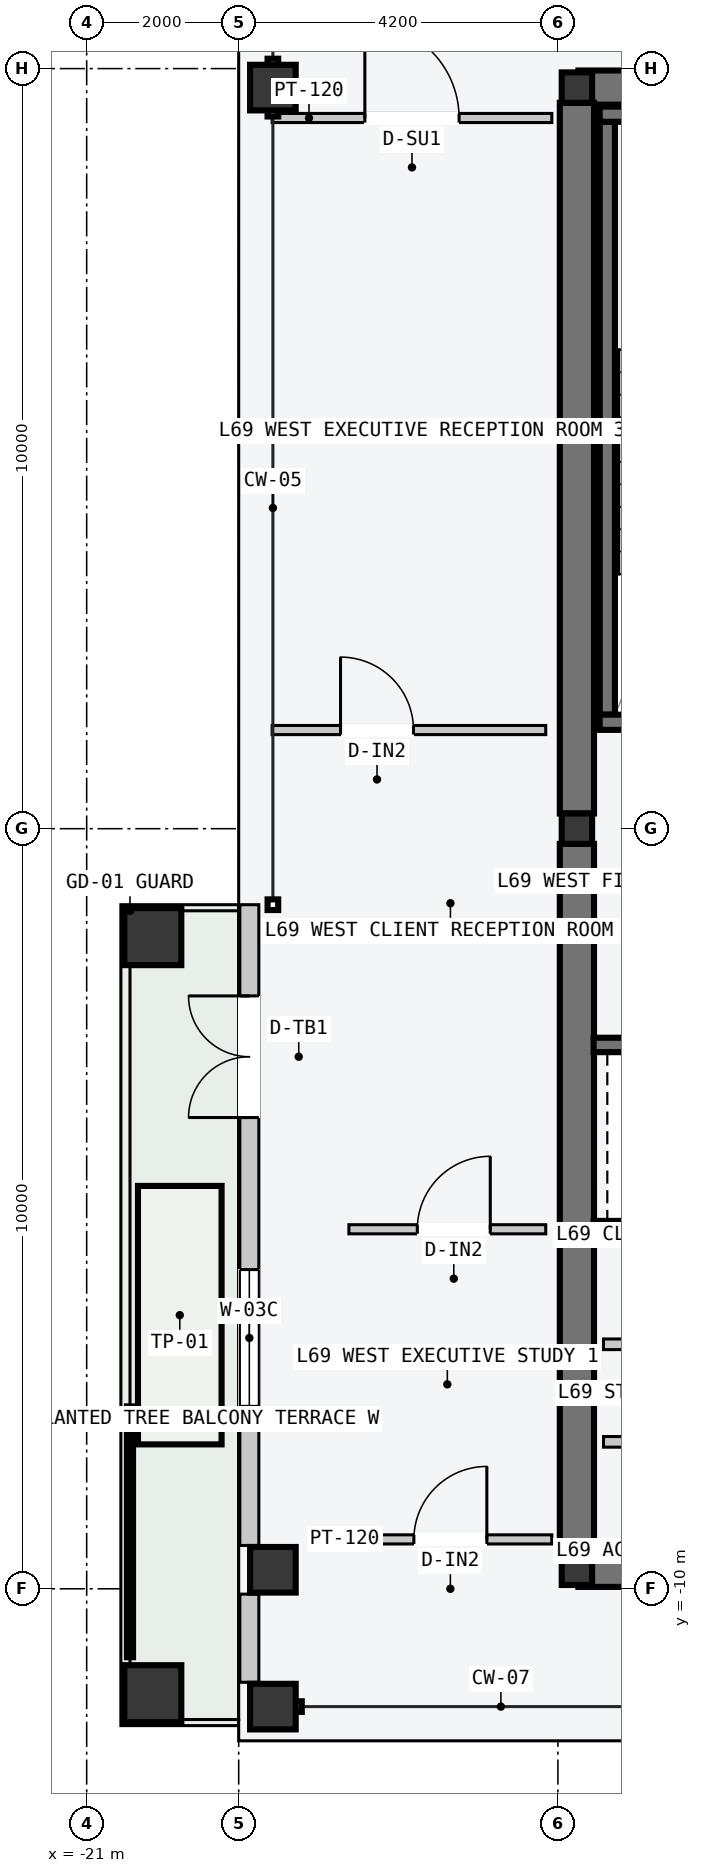
"""IFC4 building model, lengths in metres.
Left out: names, types, materials, properties, quantities, classifications, styles, units other than length and angle.
Written with IfcOpenShell. Run it as: python <this file> out.ifc"""

import sys

from ifc_helpers import new_model, si_unit, direction, frame, frame_2d, origin, origin_2d, place, context, subcontext, project, spatial, rectangle, hollow_rectangle, i_section, extrude, element, fill, save


model = new_model("IFC4")
c1 = context("Model", 3, precision=1e-05, world=origin(), true_north=direction((0.0, 1.0)))
c2 = subcontext(c1, "Body", "Model", "MODEL_VIEW")
j1 = project(units=[si_unit("LENGTHUNIT", "METRE"), si_unit("PLANEANGLEUNIT", "RADIAN")], contexts=[c1])
p1 = place(None, origin())
s1 = spatial("IfcSite", under=j1, at=p1, CompositionType="ELEMENT")
p2 = place(p1, origin())
s2 = spatial("IfcBuilding", under=s1, at=p2, CompositionType="ELEMENT")
p3 = place(p2, frame((0.0, 0.0, 261.6)))
s3 = spatial("IfcBuildingStorey", under=s2, at=p3, CompositionType="ELEMENT", Elevation=261.6)
for number, where, z_axis, x_axis in (
    (1, (-14.53, -9.75, -0.2), (0.0, 0.0, 1.0), (1.0, 0.0, 0.0)),
    (2, (-14.53, 9.75, -0.2), (0.0, 0.0, 1.0), (1.0, 0.0, 0.0)),
):
    element("IfcWall", number, at=place(p3, frame(where, z_axis=z_axis, x_axis=x_axis)), inside=s3, PredefinedType="SHEAR", context=c2, shape_type="SweptSolid", body=[
        extrude(rectangle(XDim=6.46, YDim=0.45, at=frame_2d((3.23, 0.0))), origin(), (0.0, 0.0, 1.0), 3.6),
    ])
for number, where, z_axis, x_axis in (
    (3, (-14.55, -9.55, -0.2), (0.0, 0.0, 1.0), (0.0, 1.0, 0.0)),
    (4, (-14.55, 0.2, -0.2), (0.0, 0.0, 1.0), (0.0, 1.0, 0.0)),
):
    element("IfcWall", number, at=place(p3, frame(where, z_axis=z_axis, x_axis=x_axis)), inside=s3, PredefinedType="SHEAR", context=c2, shape_type="SweptSolid", body=[
        extrude(rectangle(XDim=9.35, YDim=0.45, at=frame_2d((4.675, 0.0))), origin(), (0.0, 0.0, 1.0), 3.6),
    ])
p4 = place(p3, frame((-14.15, 1.5, -0.2), z_axis=(0.0, 0.0, 1.0), x_axis=(0.0, 1.0, 0.0)))
e5 = element("IfcWall", 5, at=p4, inside=s3, PredefinedType="SOLIDWALL", context=c2, shape_type="SweptSolid", body=[
    extrude(rectangle(XDim=7.8, YDim=0.2, at=frame_2d((3.9, 0.0))), origin(), (0.0, 0.0, 1.0), 3.6),
])
p5 = place(p3, frame((-14.25, 1.4, -0.2), z_axis=(0.0, 0.0, 1.0), x_axis=(1.0, 0.0, 0.0)))
e6 = element("IfcWall", 6, at=p5, inside=s3, PredefinedType="SOLIDWALL", context=c2, shape_type="SweptSolid", body=[
    extrude(rectangle(XDim=3.72, YDim=0.2, at=frame_2d((1.86, 0.0))), origin(), (0.0, 0.0, 1.0), 3.6),
])
p6 = place(p5, frame((1.5, 0.0, 0.2)))
e7 = element("IfcOpeningElement", 7, at=p6, cuts=e6, PredefinedType="OPENING", context=c2, shape_type="SweptSolid", body=[
    extrude(rectangle(XDim=1.12, YDim=2.18, at=frame_2d((0.56, 1.09))), frame((0.0, 0.11, 0.0), z_axis=(0.0, -1.0, 0.0), x_axis=(1.0, 0.0, 0.0)), (0.0, 0.0, 1.0), 0.22),
])
p7 = place(p3, frame((-14.25, 9.4, -0.2), z_axis=(0.0, 0.0, 1.0), x_axis=(1.0, 0.0, 0.0)))
e8 = element("IfcWall", 8, at=p7, inside=s3, PredefinedType="SOLIDWALL", context=c2, shape_type="SweptSolid", body=[
    extrude(rectangle(XDim=3.72, YDim=0.2, at=frame_2d((1.86, 0.0))), origin(), (0.0, 0.0, 1.0), 3.6),
])
for number, where, z_axis, x_axis in (
    (9, (-14.55, -9.75, 0.0), (0.0, 0.0, 1.0), (1.0, 0.0, 0.0)),
    (10, (-14.55, 0.0, 0.0), (0.0, 0.0, 1.0), (1.0, 0.0, 0.0)),
    (11, (-14.55, 9.75, 0.0), (0.0, 0.0, 1.0), (1.0, 0.0, 0.0)),
):
    element("IfcColumn", number, at=place(p3, frame(where, z_axis=z_axis, x_axis=x_axis)), inside=s3, PredefinedType="COLUMN", context=c2, shape_type="SweptSolid", body=[
        extrude(i_section(OverallWidth=0.4, OverallDepth=0.4, WebThickness=0.013, FlangeThickness=0.021, at=origin_2d()), origin(), (0.0, 0.0, 1.0), 3.6),
    ])
for number, where, z_axis, x_axis in (
    (12, (-18.55, -11.55, 0.0), (0.0, 0.0, 1.0), (0.0, 1.0, 0.0)),
    (13, (-18.55, -9.75, 0.0), (0.0, 0.0, 1.0), (0.0, 1.0, 0.0)),
    (14, (-18.55, 9.75, 0.0), (0.0, 0.0, 1.0), (0.0, 1.0, 0.0)),
):
    element("IfcColumn", number, at=place(p3, frame(where, z_axis=z_axis, x_axis=x_axis)), inside=s3, PredefinedType="COLUMN", context=c2, shape_type="SweptSolid", body=[
        extrude(hollow_rectangle(XDim=0.6, YDim=0.6, WallThickness=0.025, at=origin_2d()), origin(), (0.0, 0.0, 1.0), 3.6),
    ])
for number, where, z_axis, x_axis in (
    (15, (-20.13, -11.38, 0.0), (0.0, 0.0, 1.0), (0.0, 1.0, 0.0)),
    (16, (-20.13, -1.42, 0.0), (0.0, 0.0, 1.0), (0.0, 1.0, 0.0)),
):
    element("IfcColumn", number, at=place(p3, frame(where, z_axis=z_axis, x_axis=x_axis)), inside=s3, PredefinedType="COLUMN", context=c2, shape_type="SweptSolid", body=[
        extrude(hollow_rectangle(XDim=0.75, YDim=0.75, WallThickness=0.032, at=origin_2d()), origin(), (0.0, 0.0, 1.0), 3.6),
    ])
p8 = place(p3, frame((-18.86, -11.23, 0.0), z_axis=(0.0, 0.0, 1.0), x_axis=(0.0, 1.0, 0.0)))
e17 = element("IfcWall", 17, at=p8, inside=s3, PredefinedType="STANDARD", context=c2, shape_type="SweptSolid", body=[
    extrude(rectangle(XDim=1.16, YDim=0.25, at=frame_2d((0.58, 0.0))), origin(), (0.0, 0.0, 1.0), 3.4),
])
p9 = place(p3, frame((-18.86, -9.43, 0.0), z_axis=(0.0, 0.0, 1.0), x_axis=(0.0, 1.0, 0.0)))
e18 = element("IfcWall", 18, at=p9, inside=s3, PredefinedType="STANDARD", context=c2, shape_type="SweptSolid", body=[
    extrude(rectangle(XDim=8.43, YDim=0.25, at=frame_2d((4.215, 0.0))), origin(), (0.0, 0.0, 1.0), 3.4),
])
p10 = place(p9, frame((5.63, 0.0, 0.0)))
e19 = element("IfcOpeningElement", 19, at=p10, cuts=e18, PredefinedType="OPENING", context=c2, shape_type="SweptSolid", body=[
    extrude(rectangle(XDim=1.6, YDim=2.2, at=frame_2d((0.8, 1.1))), frame((0.0, 0.135, 0.0), z_axis=(0.0, -1.0, 0.0), x_axis=(1.0, 0.0, 0.0)), (0.0, 0.0, 1.0), 0.27),
])
p11 = place(p9, frame((1.83, 0.0, 0.85)))
e20 = element("IfcOpeningElement", 20, at=p11, cuts=e18, PredefinedType="OPENING", context=c2, shape_type="SweptSolid", body=[
    extrude(rectangle(XDim=1.8, YDim=2.05, at=frame_2d((0.9, 1.025))), frame((0.0, 0.135, 0.0), z_axis=(0.0, -1.0, 0.0), x_axis=(1.0, 0.0, 0.0)), (0.0, 0.0, 1.0), 0.27),
])
p12 = place(p3, frame((-14.33, -2.845, -0.2), z_axis=(0.0, 0.0, 1.0), x_axis=(1.0, 0.0, 0.0)))
e21 = element("IfcWall", 21, at=p12, inside=s3, PredefinedType="SOLIDWALL", context=c2, shape_type="SweptSolid", body=[
    extrude(rectangle(XDim=2.68, YDim=0.19, at=frame_2d((1.34, 0.0))), origin(), (0.0, 0.0, 1.0), 3.6),
])
p13 = place(p12, frame((0.83, 0.0, 0.2)))
e22 = element("IfcOpeningElement", 22, at=p13, cuts=e21, PredefinedType="OPENING", context=c2, shape_type="SweptSolid", body=[
    extrude(rectangle(XDim=1.2, YDim=2.2, at=frame_2d((0.6, 1.1))), frame((0.0, 0.105, 0.0), z_axis=(0.0, -1.0, 0.0), x_axis=(1.0, 0.0, 0.0)), (0.0, 0.0, 1.0), 0.21),
])
p14 = place(p3, frame((-14.33, -5.255, -0.2), z_axis=(0.0, 0.0, 1.0), x_axis=(1.0, 0.0, 0.0)))
e23 = element("IfcWall", 23, at=p14, inside=s3, PredefinedType="SOLIDWALL", context=c2, shape_type="SweptSolid", body=[
    extrude(rectangle(XDim=2.68, YDim=0.19, at=frame_2d((1.34, 0.0))), origin(), (0.0, 0.0, 1.0), 3.6),
])
for number, where, z_axis, x_axis in (
    (24, (-11.7, -8.067, 0.0), (0.0, 0.0, 1.0), (-1.0, 0.0, 0.0)),
    (25, (-11.7, -6.783, 0.0), (0.0, 0.0, 1.0), (-1.0, 0.0, 0.0)),
):
    element("IfcWall", number, at=place(p3, frame(where, z_axis=z_axis, x_axis=x_axis)), inside=s3, PredefinedType="PARTITIONING", context=c2, shape_type="SweptSolid", body=[
        extrude(rectangle(XDim=2.5, YDim=0.14, at=frame_2d((1.25, 0.0))), origin(), (0.0, 0.0, 1.0), 3.4),
    ])
p15 = place(p3, frame((-18.56, 9.35, 0.0), z_axis=(0.0, 0.0, 1.0), x_axis=(1.0, 0.0, 0.0)))
e26 = element("IfcWall", 26, at=p15, inside=s3, PredefinedType="PARTITIONING", context=c2, shape_type="SweptSolid", body=[
    extrude(rectangle(XDim=3.68, YDim=0.12, at=frame_2d((1.84, 0.0))), origin(), (0.0, 0.0, 1.0), 3.4),
])
p16 = place(p15, frame((1.22, 0.0, 0.0)))
e27 = element("IfcOpeningElement", 27, at=p16, cuts=e26, PredefinedType="OPENING", context=c2, shape_type="SweptSolid", body=[
    extrude(rectangle(XDim=1.24, YDim=2.24, at=frame_2d((0.62, 1.12))), frame((0.0, 0.07, 0.0), z_axis=(0.0, -1.0, 0.0), x_axis=(1.0, 0.0, 0.0)), (0.0, 0.0, 1.0), 0.14),
])
p17 = place(p3, frame((-17.55, -9.35, 0.0), z_axis=(0.0, 0.0, 1.0), x_axis=(1.0, 0.0, 0.0)))
e28 = element("IfcWall", 28, at=p17, inside=s3, PredefinedType="PARTITIONING", context=c2, shape_type="SweptSolid", body=[
    extrude(rectangle(XDim=2.67, YDim=0.12, at=frame_2d((1.335, 0.0))), origin(), (0.0, 0.0, 1.0), 3.4),
])
p18 = place(p17, frame((0.855, 0.0, 0.0)))
e29 = element("IfcOpeningElement", 29, at=p18, cuts=e28, PredefinedType="OPENING", context=c2, shape_type="SweptSolid", body=[
    extrude(rectangle(XDim=0.96, YDim=2.18, at=frame_2d((0.48, 1.09))), frame((0.0, 0.07, 0.0), z_axis=(0.0, -1.0, 0.0), x_axis=(1.0, 0.0, 0.0)), (0.0, 0.0, 1.0), 0.14),
])
p19 = place(p3, frame((-17.55, -5.27, 0.0), z_axis=(0.0, 0.0, 1.0), x_axis=(1.0, 0.0, 0.0)))
e30 = element("IfcWall", 30, at=p19, inside=s3, PredefinedType="PARTITIONING", context=c2, shape_type="SweptSolid", body=[
    extrude(rectangle(XDim=2.59, YDim=0.12, at=frame_2d((1.295, 0.0))), origin(), (0.0, 0.0, 1.0), 3.4),
])
p20 = place(p19, frame((0.9, 0.0, 0.0)))
e31 = element("IfcOpeningElement", 31, at=p20, cuts=e30, PredefinedType="OPENING", context=c2, shape_type="SweptSolid", body=[
    extrude(rectangle(XDim=0.96, YDim=2.18, at=frame_2d((0.48, 1.09))), frame((0.0, 0.07, 0.0), z_axis=(0.0, -1.0, 0.0), x_axis=(1.0, 0.0, 0.0)), (0.0, 0.0, 1.0), 0.14),
])
p21 = place(p3, frame((-18.56, 1.298, 0.0), z_axis=(0.0, 0.0, 1.0), x_axis=(1.0, 0.0, 0.0)))
e32 = element("IfcWall", 32, at=p21, inside=s3, PredefinedType="PARTITIONING", context=c2, shape_type="SweptSolid", body=[
    extrude(rectangle(XDim=3.6, YDim=0.12, at=frame_2d((1.8, 0.0))), origin(), (0.0, 0.0, 1.0), 3.4),
])
p22 = place(p21, frame((0.9, 0.0, 0.0)))
e33 = element("IfcOpeningElement", 33, at=p22, cuts=e32, PredefinedType="OPENING", context=c2, shape_type="SweptSolid", body=[
    extrude(rectangle(XDim=0.96, YDim=2.18, at=frame_2d((0.48, 1.09))), frame((0.0, 0.07, 0.0), z_axis=(0.0, -1.0, 0.0), x_axis=(1.0, 0.0, 0.0)), (0.0, 0.0, 1.0), 0.14),
])
p23 = place(p10, origin())
e34 = element("IfcDoor", 34, at=p23, inside=s3, OperationType="DOUBLE_DOOR_SINGLE_SWING", PredefinedType="DOOR", context=c2, shape_type="SweptSolid", body=[
    extrude(rectangle(XDim=1.6, YDim=2.2, at=frame_2d((0.8, 1.1))), frame((0.0, 0.025, 0.0), z_axis=(0.0, -1.0, 0.0), x_axis=(1.0, 0.0, 0.0)), (0.0, 0.0, 1.0), 0.05),
])
fill(e19, e34)
p24 = place(p11, origin())
e35 = element("IfcWindow", 35, at=p24, inside=s3, PartitioningType="SINGLE_PANEL", PredefinedType="WINDOW", context=c2, shape_type="SweptSolid", body=[
    extrude(rectangle(XDim=1.8, YDim=2.05, at=frame_2d((0.9, 1.025))), frame((0.0, 0.03, 0.0), z_axis=(0.0, -1.0, 0.0), x_axis=(1.0, 0.0, 0.0)), (0.0, 0.0, 1.0), 0.06),
])
fill(e20, e35)
p25 = place(p16, origin())
e36 = element("IfcDoor", 36, at=p25, inside=s3, OperationType="SINGLE_SWING_LEFT", PredefinedType="DOOR", context=c2, shape_type="SweptSolid", body=[
    extrude(rectangle(XDim=1.24, YDim=2.24, at=frame_2d((0.62, 1.12))), frame((0.0, 0.025, 0.0), z_axis=(0.0, -1.0, 0.0), x_axis=(1.0, 0.0, 0.0)), (0.0, 0.0, 1.0), 0.05),
])
fill(e27, e36)
p26 = place(p18, origin())
e37 = element("IfcDoor", 37, at=p26, inside=s3, OperationType="SINGLE_SWING_RIGHT", PredefinedType="DOOR", context=c2, shape_type="SweptSolid", body=[
    extrude(rectangle(XDim=0.96, YDim=2.18, at=frame_2d((0.48, 1.09))), frame((0.0, 0.025, 0.0), z_axis=(0.0, -1.0, 0.0), x_axis=(1.0, 0.0, 0.0)), (0.0, 0.0, 1.0), 0.05),
])
fill(e29, e37)
p27 = place(p20, origin())
e38 = element("IfcDoor", 38, at=p27, inside=s3, OperationType="SINGLE_SWING_RIGHT", PredefinedType="DOOR", context=c2, shape_type="SweptSolid", body=[
    extrude(rectangle(XDim=0.96, YDim=2.18, at=frame_2d((0.48, 1.09))), frame((0.0, 0.025, 0.0), z_axis=(0.0, -1.0, 0.0), x_axis=(1.0, 0.0, 0.0)), (0.0, 0.0, 1.0), 0.05),
])
fill(e31, e38)
p28 = place(p22, origin())
e39 = element("IfcDoor", 39, at=p28, inside=s3, OperationType="SINGLE_SWING_LEFT", PredefinedType="DOOR", context=c2, shape_type="SweptSolid", body=[
    extrude(rectangle(XDim=0.96, YDim=2.18, at=frame_2d((0.48, 1.09))), frame((0.0, 0.025, 0.0), z_axis=(0.0, -1.0, 0.0), x_axis=(1.0, 0.0, 0.0)), (0.0, 0.0, 1.0), 0.05),
])
fill(e33, e39)
save(model, sys.argv[1])
